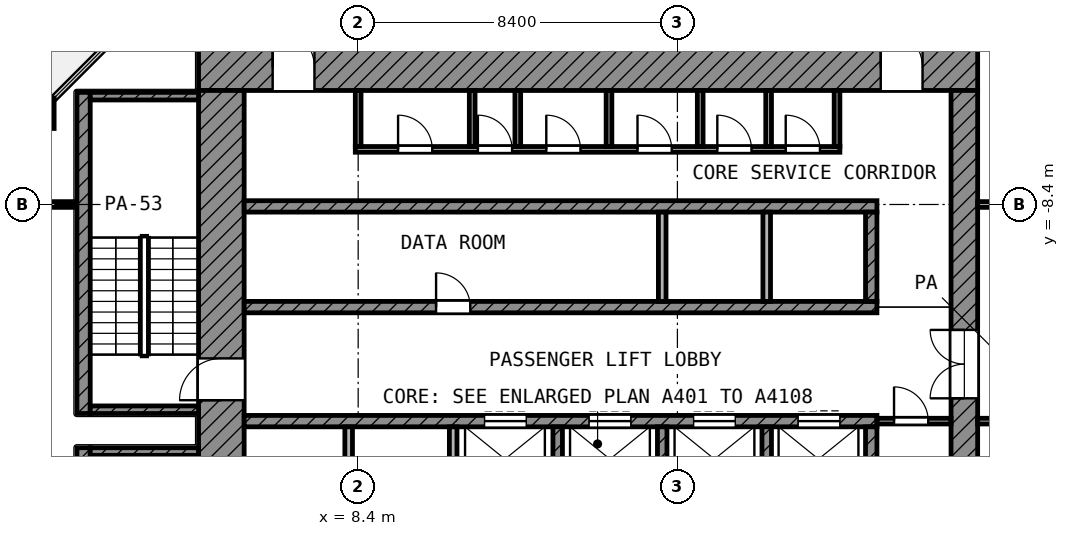
"""IFC4 building model, lengths in metres.
Left out: names, types, materials, properties, quantities, classifications, styles, units other than length and angle.
Written with IfcOpenShell. Run it as: python <this file> out.ifc"""

import sys

from ifc_helpers import new_model, si_unit, direction, frame, frame_2d, origin, origin_2d, place, context, subcontext, project, spatial, rectangle, extrude, element, fill, save


model = new_model("IFC4")
c1 = context("Model", 3, precision=1e-05, world=origin(), true_north=direction((0.0, 1.0)))
c2 = subcontext(c1, "Body", "Model", "MODEL_VIEW")
j1 = project(units=[si_unit("LENGTHUNIT", "METRE"), si_unit("PLANEANGLEUNIT", "RADIAN")], contexts=[c1])
p1 = place(None, origin())
s1 = spatial("IfcSite", under=j1, at=p1, CompositionType="ELEMENT")
p2 = place(p1, origin())
s2 = spatial("IfcBuilding", under=s1, at=p2, CompositionType="ELEMENT")
p3 = place(p2, frame((0.0, 0.0, 281.8)))
s3 = spatial("IfcBuildingStorey", under=s2, at=p3, CompositionType="ELEMENT", Elevation=281.8)
p4 = place(p3, frame((0.0, -6.0, 0.0), z_axis=(0.0, 0.0, 1.0), x_axis=(1.0, 0.0, 0.0)))
e1 = element("IfcColumn", 1, at=p4, inside=s3, PredefinedType="COLUMN", context=c2, shape_type="SweptSolid", body=[
    extrude(rectangle(XDim=0.8, YDim=0.8, at=origin_2d()), origin(), (0.0, 0.0, 1.0), 4.2),
])
p5 = place(p3, frame((4.2, -4.8, 0.0), z_axis=(0.0, 0.0, 1.0), x_axis=(1.0, 0.0, 0.0)))
e2 = element("IfcWall", 2, at=p5, inside=s3, PredefinedType="SHEAR", context=c2, shape_type="SweptSolid", body=[
    extrude(rectangle(XDim=20.5, YDim=1.2, at=frame_2d((10.25, 0.0))), origin(), (0.0, 0.0, 1.0), 3.6),
])
p6 = place(p5, frame((1.95, 0.0, 0.0)))
e3 = element("IfcOpeningElement", 3, at=p6, cuts=e2, PredefinedType="OPENING", context=c2, shape_type="SweptSolid", body=[
    extrude(rectangle(XDim=1.1, YDim=2.1, at=frame_2d((0.55, 1.05))), frame((0.0, 0.61, 0.0), z_axis=(0.0, -1.0, 0.0), x_axis=(1.0, 0.0, 0.0)), (0.0, 0.0, 1.0), 1.22),
])
p7 = place(p5, frame((17.95, 0.0, 0.0)))
e4 = element("IfcOpeningElement", 4, at=p7, cuts=e2, PredefinedType="OPENING", context=c2, shape_type="SweptSolid", body=[
    extrude(rectangle(XDim=1.1, YDim=2.1, at=frame_2d((0.55, 1.05))), frame((0.0, 0.61, 0.0), z_axis=(0.0, -1.0, 0.0), x_axis=(1.0, 0.0, 0.0)), (0.0, 0.0, 1.0), 1.22),
])
p8 = place(p3, frame((4.8, -24.7, 0.0), z_axis=(0.0, 0.0, 1.0), x_axis=(0.0, 1.0, 0.0)))
e5 = element("IfcWall", 5, at=p8, inside=s3, PredefinedType="SHEAR", context=c2, shape_type="SweptSolid", body=[
    extrude(rectangle(XDim=19.3, YDim=1.2, at=frame_2d((9.65, 0.0))), origin(), (0.0, 0.0, 1.0), 3.6),
])
p9 = place(p8, frame((11.15, 0.0, 0.0)))
e6 = element("IfcOpeningElement", 6, at=p9, cuts=e5, PredefinedType="OPENING", context=c2, shape_type="SweptSolid", body=[
    extrude(rectangle(XDim=1.1, YDim=2.1, at=frame_2d((0.55, 1.05))), frame((0.0, 0.61, 0.0), z_axis=(0.0, -1.0, 0.0), x_axis=(1.0, 0.0, 0.0)), (0.0, 0.0, 1.0), 1.22),
])
p10 = place(p8, frame((1.85, 0.0, 0.0)))
e7 = element("IfcOpeningElement", 7, at=p10, cuts=e5, PredefinedType="OPENING", context=c2, shape_type="SweptSolid", body=[
    extrude(rectangle(XDim=1.1, YDim=2.1, at=frame_2d((0.55, 1.05))), frame((0.0, 0.61, 0.0), z_axis=(0.0, -1.0, 0.0), x_axis=(1.0, 0.0, 0.0)), (0.0, 0.0, 1.0), 1.22),
])
p11 = place(p3, frame((24.35, -24.0, 0.0), z_axis=(0.0, 0.0, 1.0), x_axis=(0.0, 1.0, 0.0)))
e8 = element("IfcWall", 8, at=p11, inside=s3, PredefinedType="SHEAR", context=c2, shape_type="SweptSolid", body=[
    extrude(rectangle(XDim=18.6, YDim=0.7, at=frame_2d((9.3, 0.0))), origin(), (0.0, 0.0, 1.0), 3.6),
])
p12 = place(p11, frame((10.5, 0.0, 0.0)))
e9 = element("IfcOpeningElement", 9, at=p12, cuts=e8, PredefinedType="OPENING", context=c2, shape_type="SweptSolid", body=[
    extrude(rectangle(XDim=1.8, YDim=2.1, at=frame_2d((0.9, 1.05))), frame((0.0, 0.36, 0.0), z_axis=(0.0, -1.0, 0.0), x_axis=(1.0, 0.0, 0.0)), (0.0, 0.0, 1.0), 0.72),
])
p13 = place(p3, frame((5.4, -8.45, 0.0), z_axis=(0.0, 0.0, 1.0), x_axis=(1.0, 0.0, 0.0)))
e10 = element("IfcWall", 10, at=p13, inside=s3, PredefinedType="SHEAR", context=c2, shape_type="SweptSolid", body=[
    extrude(rectangle(XDim=16.65, YDim=0.3, at=frame_2d((8.325, 0.0))), origin(), (0.0, 0.0, 1.0), 3.6),
])
p14 = place(p3, frame((5.4, -11.1, 0.0), z_axis=(0.0, 0.0, 1.0), x_axis=(1.0, 0.0, 0.0)))
e11 = element("IfcWall", 11, at=p14, inside=s3, PredefinedType="SHEAR", context=c2, shape_type="SweptSolid", body=[
    extrude(rectangle(XDim=16.65, YDim=0.3, at=frame_2d((8.325, 0.0))), origin(), (0.0, 0.0, 1.0), 3.6),
])
p15 = place(p14, frame((5.05, 0.0, 0.0)))
e12 = element("IfcOpeningElement", 12, at=p15, cuts=e11, PredefinedType="OPENING", context=c2, shape_type="SweptSolid", body=[
    extrude(rectangle(XDim=0.9, YDim=2.1, at=frame_2d((0.45, 1.05))), frame((0.0, 0.16, 0.0), z_axis=(0.0, -1.0, 0.0), x_axis=(1.0, 0.0, 0.0)), (0.0, 0.0, 1.0), 0.32),
])
p16 = place(p3, frame((5.4, -14.1, 0.0), z_axis=(0.0, 0.0, 1.0), x_axis=(1.0, 0.0, 0.0)))
e13 = element("IfcWall", 13, at=p16, inside=s3, PredefinedType="SHEAR", context=c2, shape_type="SweptSolid", body=[
    extrude(rectangle(XDim=16.65, YDim=0.3, at=frame_2d((8.325, 0.0))), origin(), (0.0, 0.0, 1.0), 3.6),
])
p17 = place(p16, frame((6.325, 0.0, 0.0)))
e14 = element("IfcOpeningElement", 14, at=p17, cuts=e13, PredefinedType="OPENING", context=c2, shape_type="SweptSolid", body=[
    extrude(rectangle(XDim=1.1, YDim=2.1, at=frame_2d((0.55, 1.05))), frame((0.0, 0.16, 0.0), z_axis=(0.0, -1.0, 0.0), x_axis=(1.0, 0.0, 0.0)), (0.0, 0.0, 1.0), 0.32),
])
p18 = place(p16, frame((9.075, 0.0, 0.0)))
e15 = element("IfcOpeningElement", 15, at=p18, cuts=e13, PredefinedType="OPENING", context=c2, shape_type="SweptSolid", body=[
    extrude(rectangle(XDim=1.1, YDim=2.1, at=frame_2d((0.55, 1.05))), frame((0.0, 0.16, 0.0), z_axis=(0.0, -1.0, 0.0), x_axis=(1.0, 0.0, 0.0)), (0.0, 0.0, 1.0), 0.32),
])
p19 = place(p16, frame((11.825, 0.0, 0.0)))
e16 = element("IfcOpeningElement", 16, at=p19, cuts=e13, PredefinedType="OPENING", context=c2, shape_type="SweptSolid", body=[
    extrude(rectangle(XDim=1.1, YDim=2.1, at=frame_2d((0.55, 1.05))), frame((0.0, 0.16, 0.0), z_axis=(0.0, -1.0, 0.0), x_axis=(1.0, 0.0, 0.0)), (0.0, 0.0, 1.0), 0.32),
])
p20 = place(p16, frame((14.575, 0.0, 0.0)))
e17 = element("IfcOpeningElement", 17, at=p20, cuts=e13, PredefinedType="OPENING", context=c2, shape_type="SweptSolid", body=[
    extrude(rectangle(XDim=1.1, YDim=2.1, at=frame_2d((0.55, 1.05))), frame((0.0, 0.16, 0.0), z_axis=(0.0, -1.0, 0.0), x_axis=(1.0, 0.0, 0.0)), (0.0, 0.0, 1.0), 0.32),
])
p21 = place(p3, frame((21.9, -10.95, 0.0), z_axis=(0.0, 0.0, 1.0), x_axis=(0.0, 1.0, 0.0)))
e18 = element("IfcWall", 18, at=p21, inside=s3, PredefinedType="SHEAR", context=c2, shape_type="SweptSolid", body=[
    extrude(rectangle(XDim=2.35, YDim=0.3, at=frame_2d((1.175, 0.0))), origin(), (0.0, 0.0, 1.0), 3.6),
])
p22 = place(p3, frame((21.9, -16.6, 0.0), z_axis=(0.0, 0.0, 1.0), x_axis=(0.0, 1.0, 0.0)))
e19 = element("IfcWall", 19, at=p22, inside=s3, PredefinedType="SHEAR", context=c2, shape_type="SweptSolid", body=[
    extrude(rectangle(XDim=2.35, YDim=0.3, at=frame_2d((1.175, 0.0))), origin(), (0.0, 0.0, 1.0), 3.6),
])
for number, where, z_axis, x_axis in (
    (20, (16.4, -10.95, 0.0), (0.0, 0.0, 1.0), (0.0, 1.0, 0.0)),
    (21, (19.15, -10.95, 0.0), (0.0, 0.0, 1.0), (0.0, 1.0, 0.0)),
):
    element("IfcWall", number, at=place(p3, frame(where, z_axis=z_axis, x_axis=x_axis)), inside=s3, PredefinedType="PARTITIONING", context=c2, shape_type="SweptSolid", body=[
        extrude(rectangle(XDim=2.35, YDim=0.2, at=frame_2d((1.175, 0.0))), origin(), (0.0, 0.0, 1.0), 3.6),
    ])
for number, where, z_axis, x_axis in (
    (22, (8.15, -16.6, 0.0), (0.0, 0.0, 1.0), (0.0, 1.0, 0.0)),
    (23, (10.9, -16.6, 0.0), (0.0, 0.0, 1.0), (0.0, 1.0, 0.0)),
):
    element("IfcWall", number, at=place(p3, frame(where, z_axis=z_axis, x_axis=x_axis)), inside=s3, PredefinedType="PARTITIONING", context=c2, shape_type="SweptSolid", body=[
        extrude(rectangle(XDim=2.35, YDim=0.2, at=frame_2d((1.175, 0.0))), origin(), (0.0, 0.0, 1.0), 3.6),
    ])
for number, where, z_axis, x_axis in (
    (24, (13.65, -16.6, 0.0), (0.0, 0.0, 1.0), (0.0, 1.0, 0.0)),
    (25, (16.4, -16.6, 0.0), (0.0, 0.0, 1.0), (0.0, 1.0, 0.0)),
    (26, (19.15, -16.6, 0.0), (0.0, 0.0, 1.0), (0.0, 1.0, 0.0)),
):
    element("IfcWall", number, at=place(p3, frame(where, z_axis=z_axis, x_axis=x_axis)), inside=s3, PredefinedType="SHEAR", context=c2, shape_type="SweptSolid", body=[
        extrude(rectangle(XDim=2.35, YDim=0.25, at=frame_2d((1.175, 0.0))), origin(), (0.0, 0.0, 1.0), 3.6),
    ])
p23 = place(p3, frame((22.05, -14.1, 0.0), z_axis=(0.0, 0.0, 1.0), x_axis=(1.0, 0.0, 0.0)))
e27 = element("IfcWall", 27, at=p23, inside=s3, PredefinedType="PARTITIONING", context=c2, shape_type="SweptSolid", body=[
    extrude(rectangle(XDim=1.95, YDim=0.15, at=frame_2d((0.975, 0.0))), origin(), (0.0, 0.0, 1.0), 3.6),
])
p24 = place(p23, frame((0.45, 0.0, 0.0)))
e28 = element("IfcOpeningElement", 28, at=p24, cuts=e27, PredefinedType="OPENING", context=c2, shape_type="SweptSolid", body=[
    extrude(rectangle(XDim=0.9, YDim=2.1, at=frame_2d((0.45, 1.05))), frame((0.0, 0.085, 0.0), z_axis=(0.0, -1.0, 0.0), x_axis=(1.0, 0.0, 0.0)), (0.0, 0.0, 1.0), 0.17),
])
p25 = place(p3, frame((8.325, -6.95, 0.0), z_axis=(0.0, 0.0, 1.0), x_axis=(1.0, 0.0, 0.0)))
e29 = element("IfcWall", 29, at=p25, inside=s3, PredefinedType="PARTITIONING", context=c2, shape_type="SweptSolid", body=[
    extrude(rectangle(XDim=12.75, YDim=0.15, at=frame_2d((6.375, 0.0))), origin(), (0.0, 0.0, 1.0), 3.6),
])
p26 = place(p25, frame((1.125, 0.0, 0.0)))
e30 = element("IfcOpeningElement", 30, at=p26, cuts=e29, PredefinedType="OPENING", context=c2, shape_type="SweptSolid", body=[
    extrude(rectangle(XDim=0.9, YDim=2.1, at=frame_2d((0.45, 1.05))), frame((0.0, 0.085, 0.0), z_axis=(0.0, -1.0, 0.0), x_axis=(1.0, 0.0, 0.0)), (0.0, 0.0, 1.0), 0.17),
])
p27 = place(p25, frame((3.225, 0.0, 0.0)))
e31 = element("IfcOpeningElement", 31, at=p27, cuts=e29, PredefinedType="OPENING", context=c2, shape_type="SweptSolid", body=[
    extrude(rectangle(XDim=0.9, YDim=2.1, at=frame_2d((0.45, 1.05))), frame((0.0, 0.085, 0.0), z_axis=(0.0, -1.0, 0.0), x_axis=(1.0, 0.0, 0.0)), (0.0, 0.0, 1.0), 0.17),
])
p28 = place(p25, frame((5.025, 0.0, 0.0)))
e32 = element("IfcOpeningElement", 32, at=p28, cuts=e29, PredefinedType="OPENING", context=c2, shape_type="SweptSolid", body=[
    extrude(rectangle(XDim=0.9, YDim=2.1, at=frame_2d((0.45, 1.05))), frame((0.0, 0.085, 0.0), z_axis=(0.0, -1.0, 0.0), x_axis=(1.0, 0.0, 0.0)), (0.0, 0.0, 1.0), 0.17),
])
p29 = place(p25, frame((7.425, 0.0, 0.0)))
e33 = element("IfcOpeningElement", 33, at=p29, cuts=e29, PredefinedType="OPENING", context=c2, shape_type="SweptSolid", body=[
    extrude(rectangle(XDim=0.9, YDim=2.1, at=frame_2d((0.45, 1.05))), frame((0.0, 0.085, 0.0), z_axis=(0.0, -1.0, 0.0), x_axis=(1.0, 0.0, 0.0)), (0.0, 0.0, 1.0), 0.17),
])
p30 = place(p25, frame((9.525, 0.0, 0.0)))
e34 = element("IfcOpeningElement", 34, at=p30, cuts=e29, PredefinedType="OPENING", context=c2, shape_type="SweptSolid", body=[
    extrude(rectangle(XDim=0.9, YDim=2.1, at=frame_2d((0.45, 1.05))), frame((0.0, 0.085, 0.0), z_axis=(0.0, -1.0, 0.0), x_axis=(1.0, 0.0, 0.0)), (0.0, 0.0, 1.0), 0.17),
])
p31 = place(p25, frame((11.325, 0.0, 0.0)))
e35 = element("IfcOpeningElement", 35, at=p31, cuts=e29, PredefinedType="OPENING", context=c2, shape_type="SweptSolid", body=[
    extrude(rectangle(XDim=0.9, YDim=2.1, at=frame_2d((0.45, 1.05))), frame((0.0, 0.085, 0.0), z_axis=(0.0, -1.0, 0.0), x_axis=(1.0, 0.0, 0.0)), (0.0, 0.0, 1.0), 0.17),
])
for number, where, z_axis, x_axis in (
    (36, (8.4, -6.875, 0.0), (0.0, 0.0, 1.0), (0.0, 1.0, 0.0)),
    (37, (11.4, -6.875, 0.0), (0.0, 0.0, 1.0), (0.0, 1.0, 0.0)),
    (38, (12.6, -6.875, 0.0), (0.0, 0.0, 1.0), (0.0, 1.0, 0.0)),
    (39, (15.0, -6.875, 0.0), (0.0, 0.0, 1.0), (0.0, 1.0, 0.0)),
    (40, (17.4, -6.875, 0.0), (0.0, 0.0, 1.0), (0.0, 1.0, 0.0)),
    (41, (19.2, -6.875, 0.0), (0.0, 0.0, 1.0), (0.0, 1.0, 0.0)),
    (42, (21.0, -6.875, 0.0), (0.0, 0.0, 1.0), (0.0, 1.0, 0.0)),
):
    element("IfcWall", number, at=place(p3, frame(where, z_axis=z_axis, x_axis=x_axis)), inside=s3, PredefinedType="PARTITIONING", context=c2, shape_type="SweptSolid", body=[
        extrude(rectangle(XDim=1.475, YDim=0.15, at=frame_2d((0.738, 0.0))), origin(), (0.0, 0.0, 1.0), 3.6),
    ])
p32 = place(p3, frame((1.175, -13.9, 0.0), z_axis=(0.0, 0.0, 1.0), x_axis=(0.0, 1.0, 0.0)))
e43 = element("IfcWall", 43, at=p32, inside=s3, PredefinedType="SHEAR", context=c2, shape_type="SweptSolid", body=[
    extrude(rectangle(XDim=8.45, YDim=0.35, at=frame_2d((4.225, 0.0))), origin(), (0.0, 0.0, 1.0), 3.6),
])
for number, where, z_axis, x_axis in (
    (44, (1.35, -5.55, 0.0), (0.0, 0.0, 1.0), (1.0, 0.0, 0.0)),
    (45, (1.35, -13.8, 0.0), (0.0, 0.0, 1.0), (1.0, 0.0, 0.0)),
):
    element("IfcWall", number, at=place(p3, frame(where, z_axis=z_axis, x_axis=x_axis)), inside=s3, PredefinedType="SHEAR", context=c2, shape_type="SweptSolid", body=[
        extrude(rectangle(XDim=2.85, YDim=0.2, at=frame_2d((1.425, 0.0))), origin(), (0.0, 0.0, 1.0), 3.6),
    ])
p33 = place(p3, frame((1.175, -23.25, 0.0), z_axis=(0.0, 0.0, 1.0), x_axis=(0.0, 1.0, 0.0)))
e46 = element("IfcWall", 46, at=p33, inside=s3, PredefinedType="SHEAR", context=c2, shape_type="SweptSolid", body=[
    extrude(rectangle(XDim=8.45, YDim=0.35, at=frame_2d((4.225, 0.0))), origin(), (0.0, 0.0, 1.0), 3.6),
])
p34 = place(p3, frame((1.35, -14.9, 0.0), z_axis=(0.0, 0.0, 1.0), x_axis=(1.0, 0.0, 0.0)))
e47 = element("IfcWall", 47, at=p34, inside=s3, PredefinedType="SHEAR", context=c2, shape_type="SweptSolid", body=[
    extrude(rectangle(XDim=2.85, YDim=0.2, at=frame_2d((1.425, 0.0))), origin(), (0.0, 0.0, 1.0), 3.6),
])
p35 = place(p3, frame((24.7, -14.1, 0.0), z_axis=(0.0, 0.0, 1.0), x_axis=(1.0, 0.0, 0.0)))
e48 = element("IfcWall", 48, at=p35, inside=s3, PredefinedType="PARTITIONING", context=c2, shape_type="SweptSolid", body=[
    extrude(rectangle(XDim=4.625, YDim=0.15, at=frame_2d((2.312, 0.0))), origin(), (0.0, 0.0, 1.0), 3.6),
])
p36 = place(p35, frame((2.8, 0.0, 0.0)))
e49 = element("IfcOpeningElement", 49, at=p36, cuts=e48, PredefinedType="OPENING", context=c2, shape_type="SweptSolid", body=[
    extrude(rectangle(XDim=1.0, YDim=2.1, at=frame_2d((0.5, 1.05))), frame((0.0, 0.085, 0.0), z_axis=(0.0, -1.0, 0.0), x_axis=(1.0, 0.0, 0.0)), (0.0, 0.0, 1.0), 0.17),
])
p37 = place(p35, frame((1.4, 0.0, 0.0)))
e50 = element("IfcOpeningElement", 50, at=p37, cuts=e48, PredefinedType="OPENING", context=c2, shape_type="SweptSolid", body=[
    extrude(rectangle(XDim=1.0, YDim=2.1, at=frame_2d((0.5, 1.05))), frame((0.0, 0.085, 0.0), z_axis=(0.0, -1.0, 0.0), x_axis=(1.0, 0.0, 0.0)), (0.0, 0.0, 1.0), 0.17),
])
p38 = place(p3, frame((0.08, -8.4, 0.0), z_axis=(0.0, 0.0, 1.0), x_axis=(1.0, 0.0, 0.0)))
e51 = element("IfcWall", 51, at=p38, inside=s3, PredefinedType="PARTITIONING", context=c2, shape_type="SweptSolid", body=[
    extrude(rectangle(XDim=0.89, YDim=0.15, at=frame_2d((0.445, 0.0))), origin(), (0.0, 0.0, 1.0), 2.7),
])
p39 = place(p3, frame((24.7, -8.4, 0.0), z_axis=(0.0, 0.0, 1.0), x_axis=(1.0, 0.0, 0.0)))
e52 = element("IfcWall", 52, at=p39, inside=s3, PredefinedType="PARTITIONING", context=c2, shape_type="SweptSolid", body=[
    extrude(rectangle(XDim=15.582, YDim=0.15, at=frame_2d((7.791, 0.0))), origin(), (0.0, 0.0, 1.0), 3.6),
])
p40 = place(p39, frame((2.3, 0.0, 0.0)))
e53 = element("IfcOpeningElement", 53, at=p40, cuts=e52, PredefinedType="OPENING", context=c2, shape_type="SweptSolid", body=[
    extrude(rectangle(XDim=1.2, YDim=2.1, at=frame_2d((0.6, 1.05))), frame((0.0, 0.085, 0.0), z_axis=(0.0, -1.0, 0.0), x_axis=(1.0, 0.0, 0.0)), (0.0, 0.0, 1.0), 0.17),
])
p41 = place(p39, frame((6.6, 0.0, 0.0)))
e54 = element("IfcOpeningElement", 54, at=p41, cuts=e52, PredefinedType="OPENING", context=c2, shape_type="SweptSolid", body=[
    extrude(rectangle(XDim=1.0, YDim=2.1, at=frame_2d((0.5, 1.05))), frame((0.0, 0.085, 0.0), z_axis=(0.0, -1.0, 0.0), x_axis=(1.0, 0.0, 0.0)), (0.0, 0.0, 1.0), 0.17),
])
p42 = place(p39, frame((10.35, 0.0, 0.0)))
e55 = element("IfcOpeningElement", 55, at=p42, cuts=e52, PredefinedType="OPENING", context=c2, shape_type="SweptSolid", body=[
    extrude(rectangle(XDim=1.0, YDim=2.1, at=frame_2d((0.5, 1.05))), frame((0.0, 0.085, 0.0), z_axis=(0.0, -1.0, 0.0), x_axis=(1.0, 0.0, 0.0)), (0.0, 0.0, 1.0), 0.17),
])
p43 = place(p17, origin())
e56 = element("IfcDoor", 56, at=p43, inside=s3, OperationType="DOUBLE_DOOR_SLIDING", PredefinedType="DOOR", context=c2, shape_type="SweptSolid", body=[
    extrude(rectangle(XDim=1.1, YDim=2.1, at=frame_2d((0.55, 1.05))), frame((0.0, 0.025, 0.0), z_axis=(0.0, -1.0, 0.0), x_axis=(1.0, 0.0, 0.0)), (0.0, 0.0, 1.0), 0.05),
])
fill(e14, e56)
p44 = place(p18, origin())
e57 = element("IfcDoor", 57, at=p44, inside=s3, OperationType="DOUBLE_DOOR_SLIDING", PredefinedType="DOOR", context=c2, shape_type="SweptSolid", body=[
    extrude(rectangle(XDim=1.1, YDim=2.1, at=frame_2d((0.55, 1.05))), frame((0.0, 0.025, 0.0), z_axis=(0.0, -1.0, 0.0), x_axis=(1.0, 0.0, 0.0)), (0.0, 0.0, 1.0), 0.05),
])
fill(e15, e57)
p45 = place(p19, origin())
e58 = element("IfcDoor", 58, at=p45, inside=s3, OperationType="DOUBLE_DOOR_SLIDING", PredefinedType="DOOR", context=c2, shape_type="SweptSolid", body=[
    extrude(rectangle(XDim=1.1, YDim=2.1, at=frame_2d((0.55, 1.05))), frame((0.0, 0.025, 0.0), z_axis=(0.0, -1.0, 0.0), x_axis=(1.0, 0.0, 0.0)), (0.0, 0.0, 1.0), 0.05),
])
fill(e16, e58)
p46 = place(p20, origin())
e59 = element("IfcDoor", 59, at=p46, inside=s3, OperationType="DOUBLE_DOOR_SLIDING", PredefinedType="DOOR", context=c2, shape_type="SweptSolid", body=[
    extrude(rectangle(XDim=1.1, YDim=2.1, at=frame_2d((0.55, 1.05))), frame((0.0, 0.025, 0.0), z_axis=(0.0, -1.0, 0.0), x_axis=(1.0, 0.0, 0.0)), (0.0, 0.0, 1.0), 0.05),
])
fill(e17, e59)
p47 = place(p9, origin())
e60 = element("IfcDoor", 60, at=p47, inside=s3, OperationType="SINGLE_SWING_LEFT", PredefinedType="DOOR", context=c2, shape_type="SweptSolid", body=[
    extrude(rectangle(XDim=1.1, YDim=2.1, at=frame_2d((0.55, 1.05))), frame((0.0, 0.025, 0.0), z_axis=(0.0, -1.0, 0.0), x_axis=(1.0, 0.0, 0.0)), (0.0, 0.0, 1.0), 0.05),
])
fill(e6, e60)
p48 = place(p6, origin())
e61 = element("IfcDoor", 61, at=p48, inside=s3, OperationType="SINGLE_SWING_LEFT", PredefinedType="DOOR", context=c2, shape_type="SweptSolid", body=[
    extrude(rectangle(XDim=1.1, YDim=2.1, at=frame_2d((0.55, 1.05))), frame((0.0, 0.025, 0.0), z_axis=(0.0, -1.0, 0.0), x_axis=(1.0, 0.0, 0.0)), (0.0, 0.0, 1.0), 0.05),
])
fill(e3, e61)
p49 = place(p7, origin())
e62 = element("IfcDoor", 62, at=p49, inside=s3, OperationType="SINGLE_SWING_LEFT", PredefinedType="DOOR", context=c2, shape_type="SweptSolid", body=[
    extrude(rectangle(XDim=1.1, YDim=2.1, at=frame_2d((0.55, 1.05))), frame((0.0, 0.025, 0.0), z_axis=(0.0, -1.0, 0.0), x_axis=(1.0, 0.0, 0.0)), (0.0, 0.0, 1.0), 0.05),
])
fill(e4, e62)
p50 = place(p12, origin())
e63 = element("IfcDoor", 63, at=p50, inside=s3, OperationType="DOUBLE_DOOR_SINGLE_SWING", PredefinedType="DOOR", context=c2, shape_type="SweptSolid", body=[
    extrude(rectangle(XDim=1.8, YDim=2.1, at=frame_2d((0.9, 1.05))), frame((0.0, 0.025, 0.0), z_axis=(0.0, -1.0, 0.0), x_axis=(1.0, 0.0, 0.0)), (0.0, 0.0, 1.0), 0.05),
])
fill(e9, e63)
p51 = place(p26, origin())
e64 = element("IfcDoor", 64, at=p51, inside=s3, OperationType="SINGLE_SWING_LEFT", PredefinedType="DOOR", context=c2, shape_type="SweptSolid", body=[
    extrude(rectangle(XDim=0.9, YDim=2.1, at=frame_2d((0.45, 1.05))), frame((0.0, 0.025, 0.0), z_axis=(0.0, -1.0, 0.0), x_axis=(1.0, 0.0, 0.0)), (0.0, 0.0, 1.0), 0.05),
])
fill(e30, e64)
p52 = place(p27, origin())
e65 = element("IfcDoor", 65, at=p52, inside=s3, OperationType="SINGLE_SWING_LEFT", PredefinedType="DOOR", context=c2, shape_type="SweptSolid", body=[
    extrude(rectangle(XDim=0.9, YDim=2.1, at=frame_2d((0.45, 1.05))), frame((0.0, 0.025, 0.0), z_axis=(0.0, -1.0, 0.0), x_axis=(1.0, 0.0, 0.0)), (0.0, 0.0, 1.0), 0.05),
])
fill(e31, e65)
p53 = place(p28, origin())
e66 = element("IfcDoor", 66, at=p53, inside=s3, OperationType="SINGLE_SWING_LEFT", PredefinedType="DOOR", context=c2, shape_type="SweptSolid", body=[
    extrude(rectangle(XDim=0.9, YDim=2.1, at=frame_2d((0.45, 1.05))), frame((0.0, 0.025, 0.0), z_axis=(0.0, -1.0, 0.0), x_axis=(1.0, 0.0, 0.0)), (0.0, 0.0, 1.0), 0.05),
])
fill(e32, e66)
p54 = place(p29, origin())
e67 = element("IfcDoor", 67, at=p54, inside=s3, OperationType="SINGLE_SWING_LEFT", PredefinedType="DOOR", context=c2, shape_type="SweptSolid", body=[
    extrude(rectangle(XDim=0.9, YDim=2.1, at=frame_2d((0.45, 1.05))), frame((0.0, 0.025, 0.0), z_axis=(0.0, -1.0, 0.0), x_axis=(1.0, 0.0, 0.0)), (0.0, 0.0, 1.0), 0.05),
])
fill(e33, e67)
p55 = place(p30, origin())
e68 = element("IfcDoor", 68, at=p55, inside=s3, OperationType="SINGLE_SWING_LEFT", PredefinedType="DOOR", context=c2, shape_type="SweptSolid", body=[
    extrude(rectangle(XDim=0.9, YDim=2.1, at=frame_2d((0.45, 1.05))), frame((0.0, 0.025, 0.0), z_axis=(0.0, -1.0, 0.0), x_axis=(1.0, 0.0, 0.0)), (0.0, 0.0, 1.0), 0.05),
])
fill(e34, e68)
p56 = place(p31, origin())
e69 = element("IfcDoor", 69, at=p56, inside=s3, OperationType="SINGLE_SWING_LEFT", PredefinedType="DOOR", context=c2, shape_type="SweptSolid", body=[
    extrude(rectangle(XDim=0.9, YDim=2.1, at=frame_2d((0.45, 1.05))), frame((0.0, 0.025, 0.0), z_axis=(0.0, -1.0, 0.0), x_axis=(1.0, 0.0, 0.0)), (0.0, 0.0, 1.0), 0.05),
])
fill(e35, e69)
p57 = place(p24, origin())
e70 = element("IfcDoor", 70, at=p57, inside=s3, OperationType="SINGLE_SWING_LEFT", PredefinedType="DOOR", context=c2, shape_type="SweptSolid", body=[
    extrude(rectangle(XDim=0.9, YDim=2.1, at=frame_2d((0.45, 1.05))), frame((0.0, 0.025, 0.0), z_axis=(0.0, -1.0, 0.0), x_axis=(1.0, 0.0, 0.0)), (0.0, 0.0, 1.0), 0.05),
])
fill(e28, e70)
p58 = place(p15, origin())
e71 = element("IfcDoor", 71, at=p58, inside=s3, OperationType="SINGLE_SWING_LEFT", PredefinedType="DOOR", context=c2, shape_type="SweptSolid", body=[
    extrude(rectangle(XDim=0.9, YDim=2.1, at=frame_2d((0.45, 1.05))), frame((0.0, 0.025, 0.0), z_axis=(0.0, -1.0, 0.0), x_axis=(1.0, 0.0, 0.0)), (0.0, 0.0, 1.0), 0.05),
])
fill(e12, e71)
save(model, sys.argv[1])
